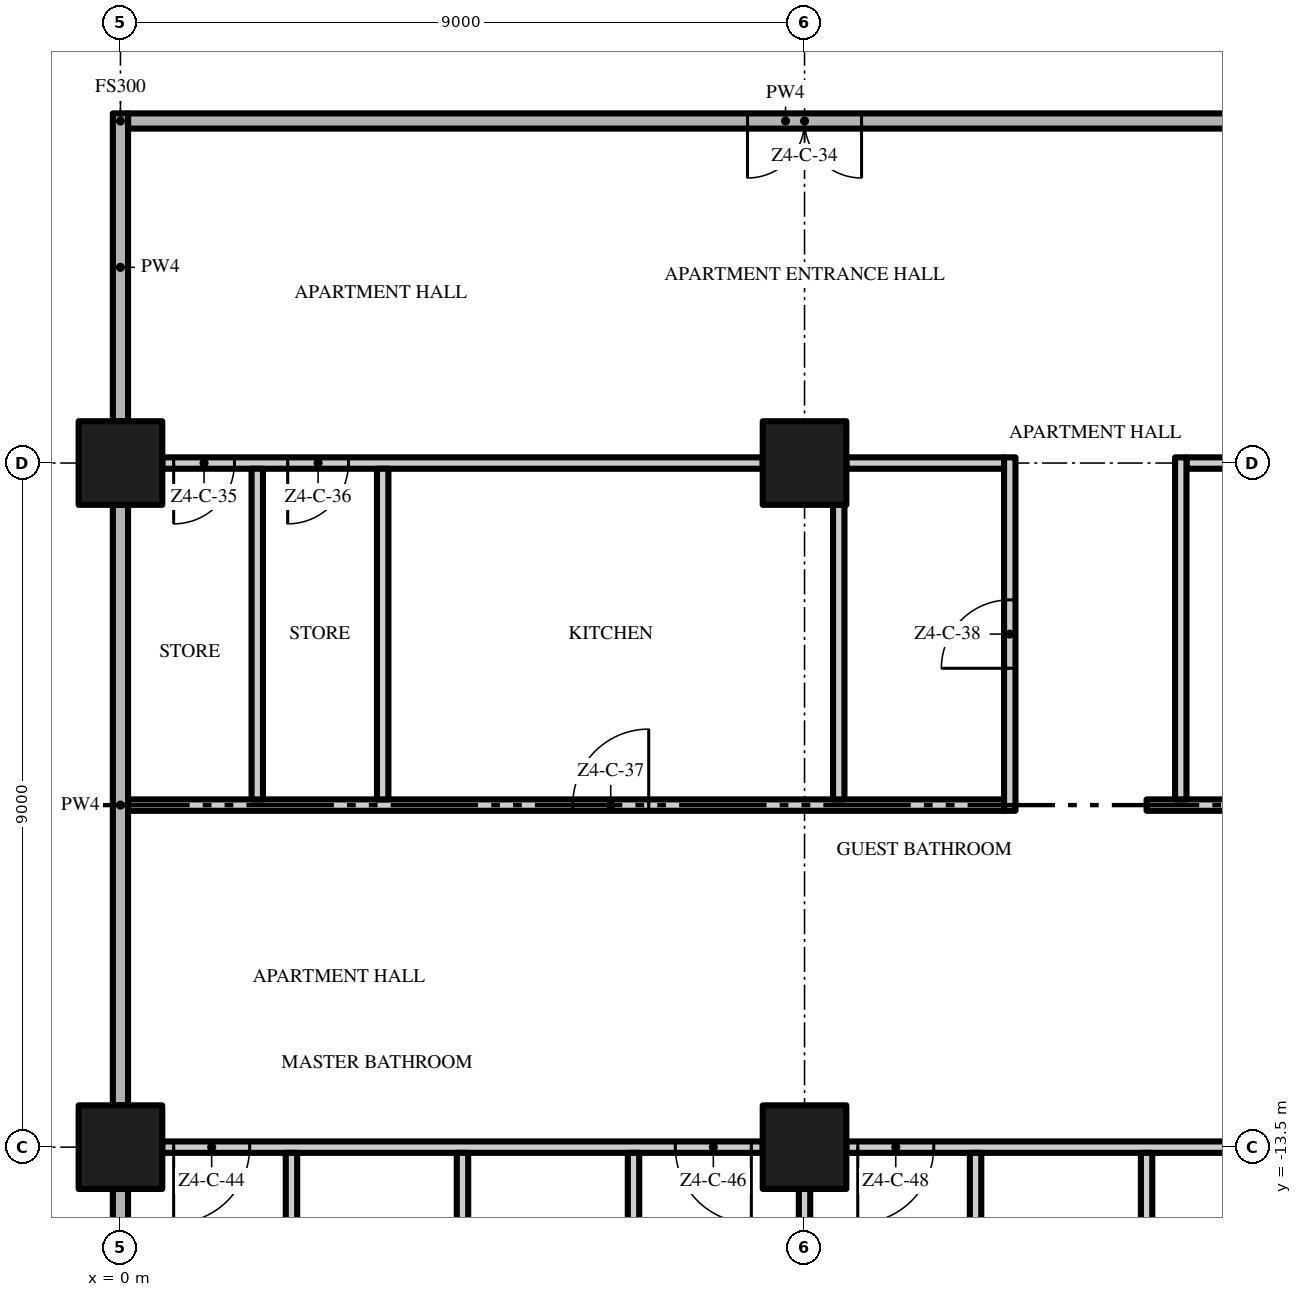
"""IFC4 building model, lengths in metres.
Left out: names, types, materials, properties, quantities, classifications, styles, units other than length and angle.
Written with IfcOpenShell. Run it as: python <this file> out.ifc"""

import sys

from ifc_helpers import new_model, si_unit, direction, frame, frame_2d, origin, origin_2d, place, context, subcontext, project, spatial, rectangle, extrude, element, fill, save


model = new_model("IFC4")
c1 = context("Model", 3, precision=1e-05, world=origin(), true_north=direction((0.0, 1.0)))
c2 = subcontext(c1, "Body", "Model", "MODEL_VIEW")
j1 = project(units=[si_unit("LENGTHUNIT", "METRE"), si_unit("PLANEANGLEUNIT", "RADIAN")], contexts=[c1])
p1 = place(None, origin())
s1 = spatial("IfcSite", under=j1, at=p1, CompositionType="ELEMENT")
p2 = place(p1, origin())
s2 = spatial("IfcBuilding", under=s1, at=p2, CompositionType="ELEMENT")
p3 = place(p2, frame((0.0, 0.0, 211.0)))
s3 = spatial("IfcBuildingStorey", under=s2, at=p3, CompositionType="ELEMENT", Elevation=211.0)
for number, where, z_axis, x_axis in (
    (1, (0.0, -13.5, 0.0), (0.0, 0.0, 1.0), (1.0, 0.0, 0.0)),
    (2, (0.0, -4.5, 0.0), (0.0, 0.0, 1.0), (1.0, 0.0, 0.0)),
    (3, (9.0, -13.5, 0.0), (0.0, 0.0, 1.0), (1.0, 0.0, 0.0)),
    (4, (9.0, -4.5, 0.0), (0.0, 0.0, 1.0), (1.0, 0.0, 0.0)),
):
    element("IfcColumn", number, at=place(p3, frame(where, z_axis=z_axis, x_axis=x_axis)), inside=s3, PredefinedType="COLUMN", context=c2, shape_type="SweptSolid", body=[
        extrude(rectangle(XDim=1.1, YDim=1.1, at=origin_2d()), origin(), (0.0, 0.0, 1.0), 3.5),
    ])
p4 = place(p3, frame((8.45, -13.5, 0.0), z_axis=(0.0, 0.0, 1.0), x_axis=(-1.0, 0.0, 0.0)))
e5 = element("IfcWall", 5, at=p4, inside=s3, PredefinedType="PARTITIONING", context=c2, shape_type="SweptSolid", body=[
    extrude(rectangle(XDim=7.9, YDim=0.15, at=frame_2d((3.95, 0.0))), origin(), (0.0, 0.0, 1.0), 3.5),
])
p5 = place(p4, frame((6.75, 0.0, 0.0)))
e6 = element("IfcOpeningElement", 6, at=p5, cuts=e5, PredefinedType="OPENING", context=c2, shape_type="SweptSolid", body=[
    extrude(rectangle(XDim=1.0, YDim=2.4, at=frame_2d((0.5, 1.2))), frame((0.0, 0.085, 0.0), z_axis=(0.0, -1.0, 0.0), x_axis=(1.0, 0.0, 0.0)), (0.0, 0.0, 1.0), 0.17),
])
p6 = place(p4, frame((0.15, 0.0, 0.0)))
e7 = element("IfcOpeningElement", 7, at=p6, cuts=e5, PredefinedType="OPENING", context=c2, shape_type="SweptSolid", body=[
    extrude(rectangle(XDim=1.0, YDim=2.4, at=frame_2d((0.5, 1.2))), frame((0.0, 0.085, 0.0), z_axis=(0.0, -1.0, 0.0), x_axis=(1.0, 0.0, 0.0)), (0.0, 0.0, 1.0), 0.17),
])
p7 = place(p3, frame((17.45, -13.5, 0.0), z_axis=(0.0, 0.0, 1.0), x_axis=(-1.0, 0.0, 0.0)))
e8 = element("IfcWall", 8, at=p7, inside=s3, PredefinedType="PARTITIONING", context=c2, shape_type="SweptSolid", body=[
    extrude(rectangle(XDim=7.9, YDim=0.15, at=frame_2d((3.95, 0.0))), origin(), (0.0, 0.0, 1.0), 3.5),
])
p8 = place(p7, frame((6.75, 0.0, 0.0)))
e9 = element("IfcOpeningElement", 9, at=p8, cuts=e8, PredefinedType="OPENING", context=c2, shape_type="SweptSolid", body=[
    extrude(rectangle(XDim=1.0, YDim=2.4, at=frame_2d((0.5, 1.2))), frame((0.0, 0.085, 0.0), z_axis=(0.0, -1.0, 0.0), x_axis=(1.0, 0.0, 0.0)), (0.0, 0.0, 1.0), 0.17),
])
p9 = place(p7, frame((0.15, 0.0, 0.0)))
e10 = element("IfcOpeningElement", 10, at=p9, cuts=e8, PredefinedType="OPENING", context=c2, shape_type="SweptSolid", body=[
    extrude(rectangle(XDim=1.0, YDim=2.4, at=frame_2d((0.5, 1.2))), frame((0.0, 0.085, 0.0), z_axis=(0.0, -1.0, 0.0), x_axis=(1.0, 0.0, 0.0)), (0.0, 0.0, 1.0), 0.17),
])
p10 = place(p3, frame((0.1, -9.0, 0.0), z_axis=(0.0, 0.0, 1.0), x_axis=(1.0, 0.0, 0.0)))
e11 = element("IfcWall", 11, at=p10, inside=s3, PredefinedType="PARTITIONING", context=c2, shape_type="SweptSolid", body=[
    extrude(rectangle(XDim=11.525, YDim=0.15, at=frame_2d((5.763, 0.0))), origin(), (0.0, 0.0, 1.0), 3.5),
])
p11 = place(p10, frame((5.85, 0.0, 0.0)))
e12 = element("IfcOpeningElement", 12, at=p11, cuts=e11, PredefinedType="OPENING", context=c2, shape_type="SweptSolid", body=[
    extrude(rectangle(XDim=1.0, YDim=2.4, at=frame_2d((0.5, 1.2))), frame((0.0, 0.085, 0.0), z_axis=(0.0, -1.0, 0.0), x_axis=(1.0, 0.0, 0.0)), (0.0, 0.0, 1.0), 0.17),
])
p12 = place(p3, frame((13.5, -9.0, 0.0), z_axis=(0.0, 0.0, 1.0), x_axis=(1.0, 0.0, 0.0)))
e13 = element("IfcWall", 13, at=p12, inside=s3, PredefinedType="PARTITIONING", context=c2, shape_type="SweptSolid", body=[
    extrude(rectangle(XDim=13.2, YDim=0.15, at=frame_2d((6.6, 0.0))), origin(), (0.0, 0.0, 1.0), 3.5),
])
p13 = place(p12, frame((4.1, 0.0, 0.0)))
e14 = element("IfcOpeningElement", 14, at=p13, cuts=e13, PredefinedType="OPENING", context=c2, shape_type="SweptSolid", body=[
    extrude(rectangle(XDim=0.8, YDim=2.0, at=frame_2d((0.4, 1.0))), frame((0.0, 0.085, 0.0), z_axis=(0.0, -1.0, 0.0), x_axis=(1.0, 0.0, 0.0)), (0.0, 0.0, 1.0), 0.17),
])
p14 = place(p3, frame((8.45, -4.5, 0.0), z_axis=(0.0, 0.0, 1.0), x_axis=(-1.0, 0.0, 0.0)))
e15 = element("IfcWall", 15, at=p14, inside=s3, PredefinedType="PARTITIONING", context=c2, shape_type="SweptSolid", body=[
    extrude(rectangle(XDim=7.9, YDim=0.15, at=frame_2d((3.95, 0.0))), origin(), (0.0, 0.0, 1.0), 3.5),
])
p15 = place(p14, frame((6.95, 0.0, 0.0)))
e16 = element("IfcOpeningElement", 16, at=p15, cuts=e15, PredefinedType="OPENING", context=c2, shape_type="SweptSolid", body=[
    extrude(rectangle(XDim=0.8, YDim=2.0, at=frame_2d((0.4, 1.0))), frame((0.0, 0.085, 0.0), z_axis=(0.0, -1.0, 0.0), x_axis=(1.0, 0.0, 0.0)), (0.0, 0.0, 1.0), 0.17),
])
p16 = place(p14, frame((5.45, 0.0, 0.0)))
e17 = element("IfcOpeningElement", 17, at=p16, cuts=e15, PredefinedType="OPENING", context=c2, shape_type="SweptSolid", body=[
    extrude(rectangle(XDim=0.8, YDim=2.0, at=frame_2d((0.4, 1.0))), frame((0.0, 0.085, 0.0), z_axis=(0.0, -1.0, 0.0), x_axis=(1.0, 0.0, 0.0)), (0.0, 0.0, 1.0), 0.17),
])
p17 = place(p3, frame((9.55, -4.5, 0.0), z_axis=(0.0, 0.0, 1.0), x_axis=(1.0, 0.0, 0.0)))
e18 = element("IfcWall", 18, at=p17, inside=s3, PredefinedType="PARTITIONING", context=c2, shape_type="SweptSolid", body=[
    extrude(rectangle(XDim=2.075, YDim=0.15, at=frame_2d((1.038, 0.0))), origin(), (0.0, 0.0, 1.0), 3.5),
])
p18 = place(p3, frame((17.45, -4.5, 0.0), z_axis=(0.0, 0.0, 1.0), x_axis=(-1.0, 0.0, 0.0)))
e19 = element("IfcWall", 19, at=p18, inside=s3, PredefinedType="PARTITIONING", context=c2, shape_type="SweptSolid", body=[
    extrude(rectangle(XDim=3.425, YDim=0.15, at=frame_2d((1.712, 0.0))), origin(), (0.0, 0.0, 1.0), 3.5),
])
p19 = place(p18, frame((1.825, 0.0, 0.0)))
e20 = element("IfcOpeningElement", 20, at=p19, cuts=e19, PredefinedType="OPENING", context=c2, shape_type="SweptSolid", body=[
    extrude(rectangle(XDim=0.8, YDim=2.0, at=frame_2d((0.4, 1.0))), frame((0.0, 0.085, 0.0), z_axis=(0.0, -1.0, 0.0), x_axis=(1.0, 0.0, 0.0)), (0.0, 0.0, 1.0), 0.17),
])
p20 = place(p3, frame((17.4, 0.0, 0.0), z_axis=(0.0, 0.0, 1.0), x_axis=(-1.0, 0.0, 0.0)))
e21 = element("IfcWall", 21, at=p20, inside=s3, PredefinedType="PARTITIONING", context=c2, shape_type="SweptSolid", body=[
    extrude(rectangle(XDim=17.3, YDim=0.2, at=frame_2d((8.65, 0.0))), origin(), (0.0, 0.0, 1.0), 3.5),
])
p21 = place(p20, frame((7.65, 0.0, 0.0)))
e22 = element("IfcOpeningElement", 22, at=p21, cuts=e21, PredefinedType="OPENING", context=c2, shape_type="SweptSolid", body=[
    extrude(rectangle(XDim=1.5, YDim=2.4, at=frame_2d((0.75, 1.2))), frame((0.0, 0.11, 0.0), z_axis=(0.0, -1.0, 0.0), x_axis=(1.0, 0.0, 0.0)), (0.0, 0.0, 1.0), 0.22),
])
p22 = place(p3, frame((0.0, -21.5, 0.0), z_axis=(0.0, 0.0, 1.0), x_axis=(0.0, 1.0, 0.0)))
e23 = element("IfcWall", 23, at=p22, inside=s3, PredefinedType="PARTITIONING", context=c2, shape_type="SweptSolid", body=[
    extrude(rectangle(XDim=7.45, YDim=0.2, at=frame_2d((3.725, 0.0))), origin(), (0.0, 0.0, 1.0), 3.5),
])
p23 = place(p3, frame((0.0, -12.95, 0.0), z_axis=(0.0, 0.0, 1.0), x_axis=(0.0, 1.0, 0.0)))
e24 = element("IfcWall", 24, at=p23, inside=s3, PredefinedType="PARTITIONING", context=c2, shape_type="SweptSolid", body=[
    extrude(rectangle(XDim=7.9, YDim=0.2, at=frame_2d((3.95, 0.0))), origin(), (0.0, 0.0, 1.0), 3.5),
])
p24 = place(p3, frame((0.0, -3.95, 0.0), z_axis=(0.0, 0.0, 1.0), x_axis=(0.0, 1.0, 0.0)))
e25 = element("IfcWall", 25, at=p24, inside=s3, PredefinedType="PARTITIONING", context=c2, shape_type="SweptSolid", body=[
    extrude(rectangle(XDim=4.05, YDim=0.2, at=frame_2d((2.025, 0.0))), origin(), (0.0, 0.0, 1.0), 3.5),
])
p25 = place(p3, frame((1.8, -8.925, 0.0), z_axis=(0.0, 0.0, 1.0), x_axis=(0.0, 1.0, 0.0)))
e26 = element("IfcWall", 26, at=p25, inside=s3, PredefinedType="PARTITIONING", context=c2, shape_type="SweptSolid", body=[
    extrude(rectangle(XDim=4.35, YDim=0.15, at=frame_2d((2.175, 0.0))), origin(), (0.0, 0.0, 1.0), 3.5),
])
p26 = place(p3, frame((2.25, -16.575, 0.0), z_axis=(0.0, 0.0, 1.0), x_axis=(0.0, 1.0, 0.0)))
e27 = element("IfcWall", 27, at=p26, inside=s3, PredefinedType="PARTITIONING", context=c2, shape_type="SweptSolid", body=[
    extrude(rectangle(XDim=3.0, YDim=0.15, at=frame_2d((1.5, 0.0))), origin(), (0.0, 0.0, 1.0), 3.5),
])
p27 = place(p3, frame((3.45, -8.925, 0.0), z_axis=(0.0, 0.0, 1.0), x_axis=(0.0, 1.0, 0.0)))
e28 = element("IfcWall", 28, at=p27, inside=s3, PredefinedType="PARTITIONING", context=c2, shape_type="SweptSolid", body=[
    extrude(rectangle(XDim=4.35, YDim=0.15, at=frame_2d((2.175, 0.0))), origin(), (0.0, 0.0, 1.0), 3.5),
])
p28 = place(p3, frame((4.5, -22.2, 0.0), z_axis=(0.0, 0.0, 1.0), x_axis=(0.0, 1.0, 0.0)))
e29 = element("IfcWall", 29, at=p28, inside=s3, PredefinedType="PARTITIONING", context=c2, shape_type="SweptSolid", body=[
    extrude(rectangle(XDim=8.625, YDim=0.15, at=frame_2d((4.312, 0.0))), origin(), (0.0, 0.0, 1.0), 3.5),
])
p29 = place(p3, frame((6.75, -16.575, 0.0), z_axis=(0.0, 0.0, 1.0), x_axis=(0.0, 1.0, 0.0)))
e30 = element("IfcWall", 30, at=p29, inside=s3, PredefinedType="PARTITIONING", context=c2, shape_type="SweptSolid", body=[
    extrude(rectangle(XDim=3.0, YDim=0.15, at=frame_2d((1.5, 0.0))), origin(), (0.0, 0.0, 1.0), 3.5),
])
p30 = place(p3, frame((9.0, -21.5, 0.0), z_axis=(0.0, 0.0, 1.0), x_axis=(0.0, 1.0, 0.0)))
e31 = element("IfcWall", 31, at=p30, inside=s3, PredefinedType="PARTITIONING", context=c2, shape_type="SweptSolid", body=[
    extrude(rectangle(XDim=7.45, YDim=0.15, at=frame_2d((3.725, 0.0))), origin(), (0.0, 0.0, 1.0), 3.5),
])
p31 = place(p3, frame((9.45, -8.925, 0.0), z_axis=(0.0, 0.0, 1.0), x_axis=(0.0, 1.0, 0.0)))
e32 = element("IfcWall", 32, at=p31, inside=s3, PredefinedType="PARTITIONING", context=c2, shape_type="SweptSolid", body=[
    extrude(rectangle(XDim=3.875, YDim=0.15, at=frame_2d((1.938, 0.0))), origin(), (0.0, 0.0, 1.0), 3.5),
])
p32 = place(p3, frame((11.25, -16.575, 0.0), z_axis=(0.0, 0.0, 1.0), x_axis=(0.0, 1.0, 0.0)))
e33 = element("IfcWall", 33, at=p32, inside=s3, PredefinedType="PARTITIONING", context=c2, shape_type="SweptSolid", body=[
    extrude(rectangle(XDim=3.0, YDim=0.15, at=frame_2d((1.5, 0.0))), origin(), (0.0, 0.0, 1.0), 3.5),
])
p33 = place(p3, frame((11.7, -9.075, 0.0), z_axis=(0.0, 0.0, 1.0), x_axis=(0.0, 1.0, 0.0)))
e34 = element("IfcWall", 34, at=p33, inside=s3, PredefinedType="PARTITIONING", context=c2, shape_type="SweptSolid", body=[
    extrude(rectangle(XDim=4.65, YDim=0.15, at=frame_2d((2.325, 0.0))), origin(), (0.0, 0.0, 1.0), 3.5),
])
p34 = place(p33, frame((1.875, 0.0, 0.0)))
e35 = element("IfcOpeningElement", 35, at=p34, cuts=e34, PredefinedType="OPENING", context=c2, shape_type="SweptSolid", body=[
    extrude(rectangle(XDim=0.9, YDim=2.1, at=frame_2d((0.45, 1.05))), frame((0.0, 0.085, 0.0), z_axis=(0.0, -1.0, 0.0), x_axis=(1.0, 0.0, 0.0)), (0.0, 0.0, 1.0), 0.17),
])
p35 = place(p3, frame((13.5, -22.2, 0.0), z_axis=(0.0, 0.0, 1.0), x_axis=(0.0, 1.0, 0.0)))
e36 = element("IfcWall", 36, at=p35, inside=s3, PredefinedType="PARTITIONING", context=c2, shape_type="SweptSolid", body=[
    extrude(rectangle(XDim=8.625, YDim=0.15, at=frame_2d((4.312, 0.0))), origin(), (0.0, 0.0, 1.0), 3.5),
])
p36 = place(p3, frame((13.95, -8.925, 0.0), z_axis=(0.0, 0.0, 1.0), x_axis=(0.0, 1.0, 0.0)))
e37 = element("IfcWall", 37, at=p36, inside=s3, PredefinedType="PARTITIONING", context=c2, shape_type="SweptSolid", body=[
    extrude(rectangle(XDim=4.5, YDim=0.15, at=frame_2d((2.25, 0.0))), origin(), (0.0, 0.0, 1.0), 3.5),
])
p37 = place(p21, origin())
e38 = element("IfcDoor", 38, at=p37, inside=s3, OperationType="DOUBLE_DOOR_SINGLE_SWING", PredefinedType="DOOR", context=c2, shape_type="SweptSolid", body=[
    extrude(rectangle(XDim=1.5, YDim=2.4, at=frame_2d((0.75, 1.2))), frame((0.0, 0.025, 0.0), z_axis=(0.0, -1.0, 0.0), x_axis=(1.0, 0.0, 0.0)), (0.0, 0.0, 1.0), 0.05),
])
fill(e22, e38)
p38 = place(p15, origin())
e39 = element("IfcDoor", 39, at=p38, inside=s3, OperationType="SINGLE_SWING_RIGHT", PredefinedType="DOOR", context=c2, shape_type="SweptSolid", body=[
    extrude(rectangle(XDim=0.8, YDim=2.0, at=frame_2d((0.4, 1.0))), frame((0.0, 0.025, 0.0), z_axis=(0.0, -1.0, 0.0), x_axis=(1.0, 0.0, 0.0)), (0.0, 0.0, 1.0), 0.05),
])
fill(e16, e39)
p39 = place(p16, origin())
e40 = element("IfcDoor", 40, at=p39, inside=s3, OperationType="SINGLE_SWING_RIGHT", PredefinedType="DOOR", context=c2, shape_type="SweptSolid", body=[
    extrude(rectangle(XDim=0.8, YDim=2.0, at=frame_2d((0.4, 1.0))), frame((0.0, 0.025, 0.0), z_axis=(0.0, -1.0, 0.0), x_axis=(1.0, 0.0, 0.0)), (0.0, 0.0, 1.0), 0.05),
])
fill(e17, e40)
p40 = place(p11, origin())
e41 = element("IfcDoor", 41, at=p40, inside=s3, OperationType="SINGLE_SWING_RIGHT", PredefinedType="DOOR", context=c2, shape_type="SweptSolid", body=[
    extrude(rectangle(XDim=1.0, YDim=2.4, at=frame_2d((0.5, 1.2))), frame((0.0, 0.025, 0.0), z_axis=(0.0, -1.0, 0.0), x_axis=(1.0, 0.0, 0.0)), (0.0, 0.0, 1.0), 0.05),
])
fill(e12, e41)
p41 = place(p34, origin())
e42 = element("IfcDoor", 42, at=p41, inside=s3, OperationType="SINGLE_SWING_LEFT", PredefinedType="DOOR", context=c2, shape_type="SweptSolid", body=[
    extrude(rectangle(XDim=0.9, YDim=2.1, at=frame_2d((0.45, 1.05))), frame((0.0, 0.025, 0.0), z_axis=(0.0, -1.0, 0.0), x_axis=(1.0, 0.0, 0.0)), (0.0, 0.0, 1.0), 0.05),
])
fill(e35, e42)
p42 = place(p5, origin())
e43 = element("IfcDoor", 43, at=p42, inside=s3, OperationType="SINGLE_SWING_RIGHT", PredefinedType="DOOR", context=c2, shape_type="SweptSolid", body=[
    extrude(rectangle(XDim=1.0, YDim=2.4, at=frame_2d((0.5, 1.2))), frame((0.0, 0.025, 0.0), z_axis=(0.0, -1.0, 0.0), x_axis=(1.0, 0.0, 0.0)), (0.0, 0.0, 1.0), 0.05),
])
fill(e6, e43)
p43 = place(p6, origin())
e44 = element("IfcDoor", 44, at=p43, inside=s3, OperationType="SINGLE_SWING_LEFT", PredefinedType="DOOR", context=c2, shape_type="SweptSolid", body=[
    extrude(rectangle(XDim=1.0, YDim=2.4, at=frame_2d((0.5, 1.2))), frame((0.0, 0.025, 0.0), z_axis=(0.0, -1.0, 0.0), x_axis=(1.0, 0.0, 0.0)), (0.0, 0.0, 1.0), 0.05),
])
fill(e7, e44)
p44 = place(p8, origin())
e45 = element("IfcDoor", 45, at=p44, inside=s3, OperationType="SINGLE_SWING_RIGHT", PredefinedType="DOOR", context=c2, shape_type="SweptSolid", body=[
    extrude(rectangle(XDim=1.0, YDim=2.4, at=frame_2d((0.5, 1.2))), frame((0.0, 0.025, 0.0), z_axis=(0.0, -1.0, 0.0), x_axis=(1.0, 0.0, 0.0)), (0.0, 0.0, 1.0), 0.05),
])
fill(e9, e45)
save(model, sys.argv[1])
